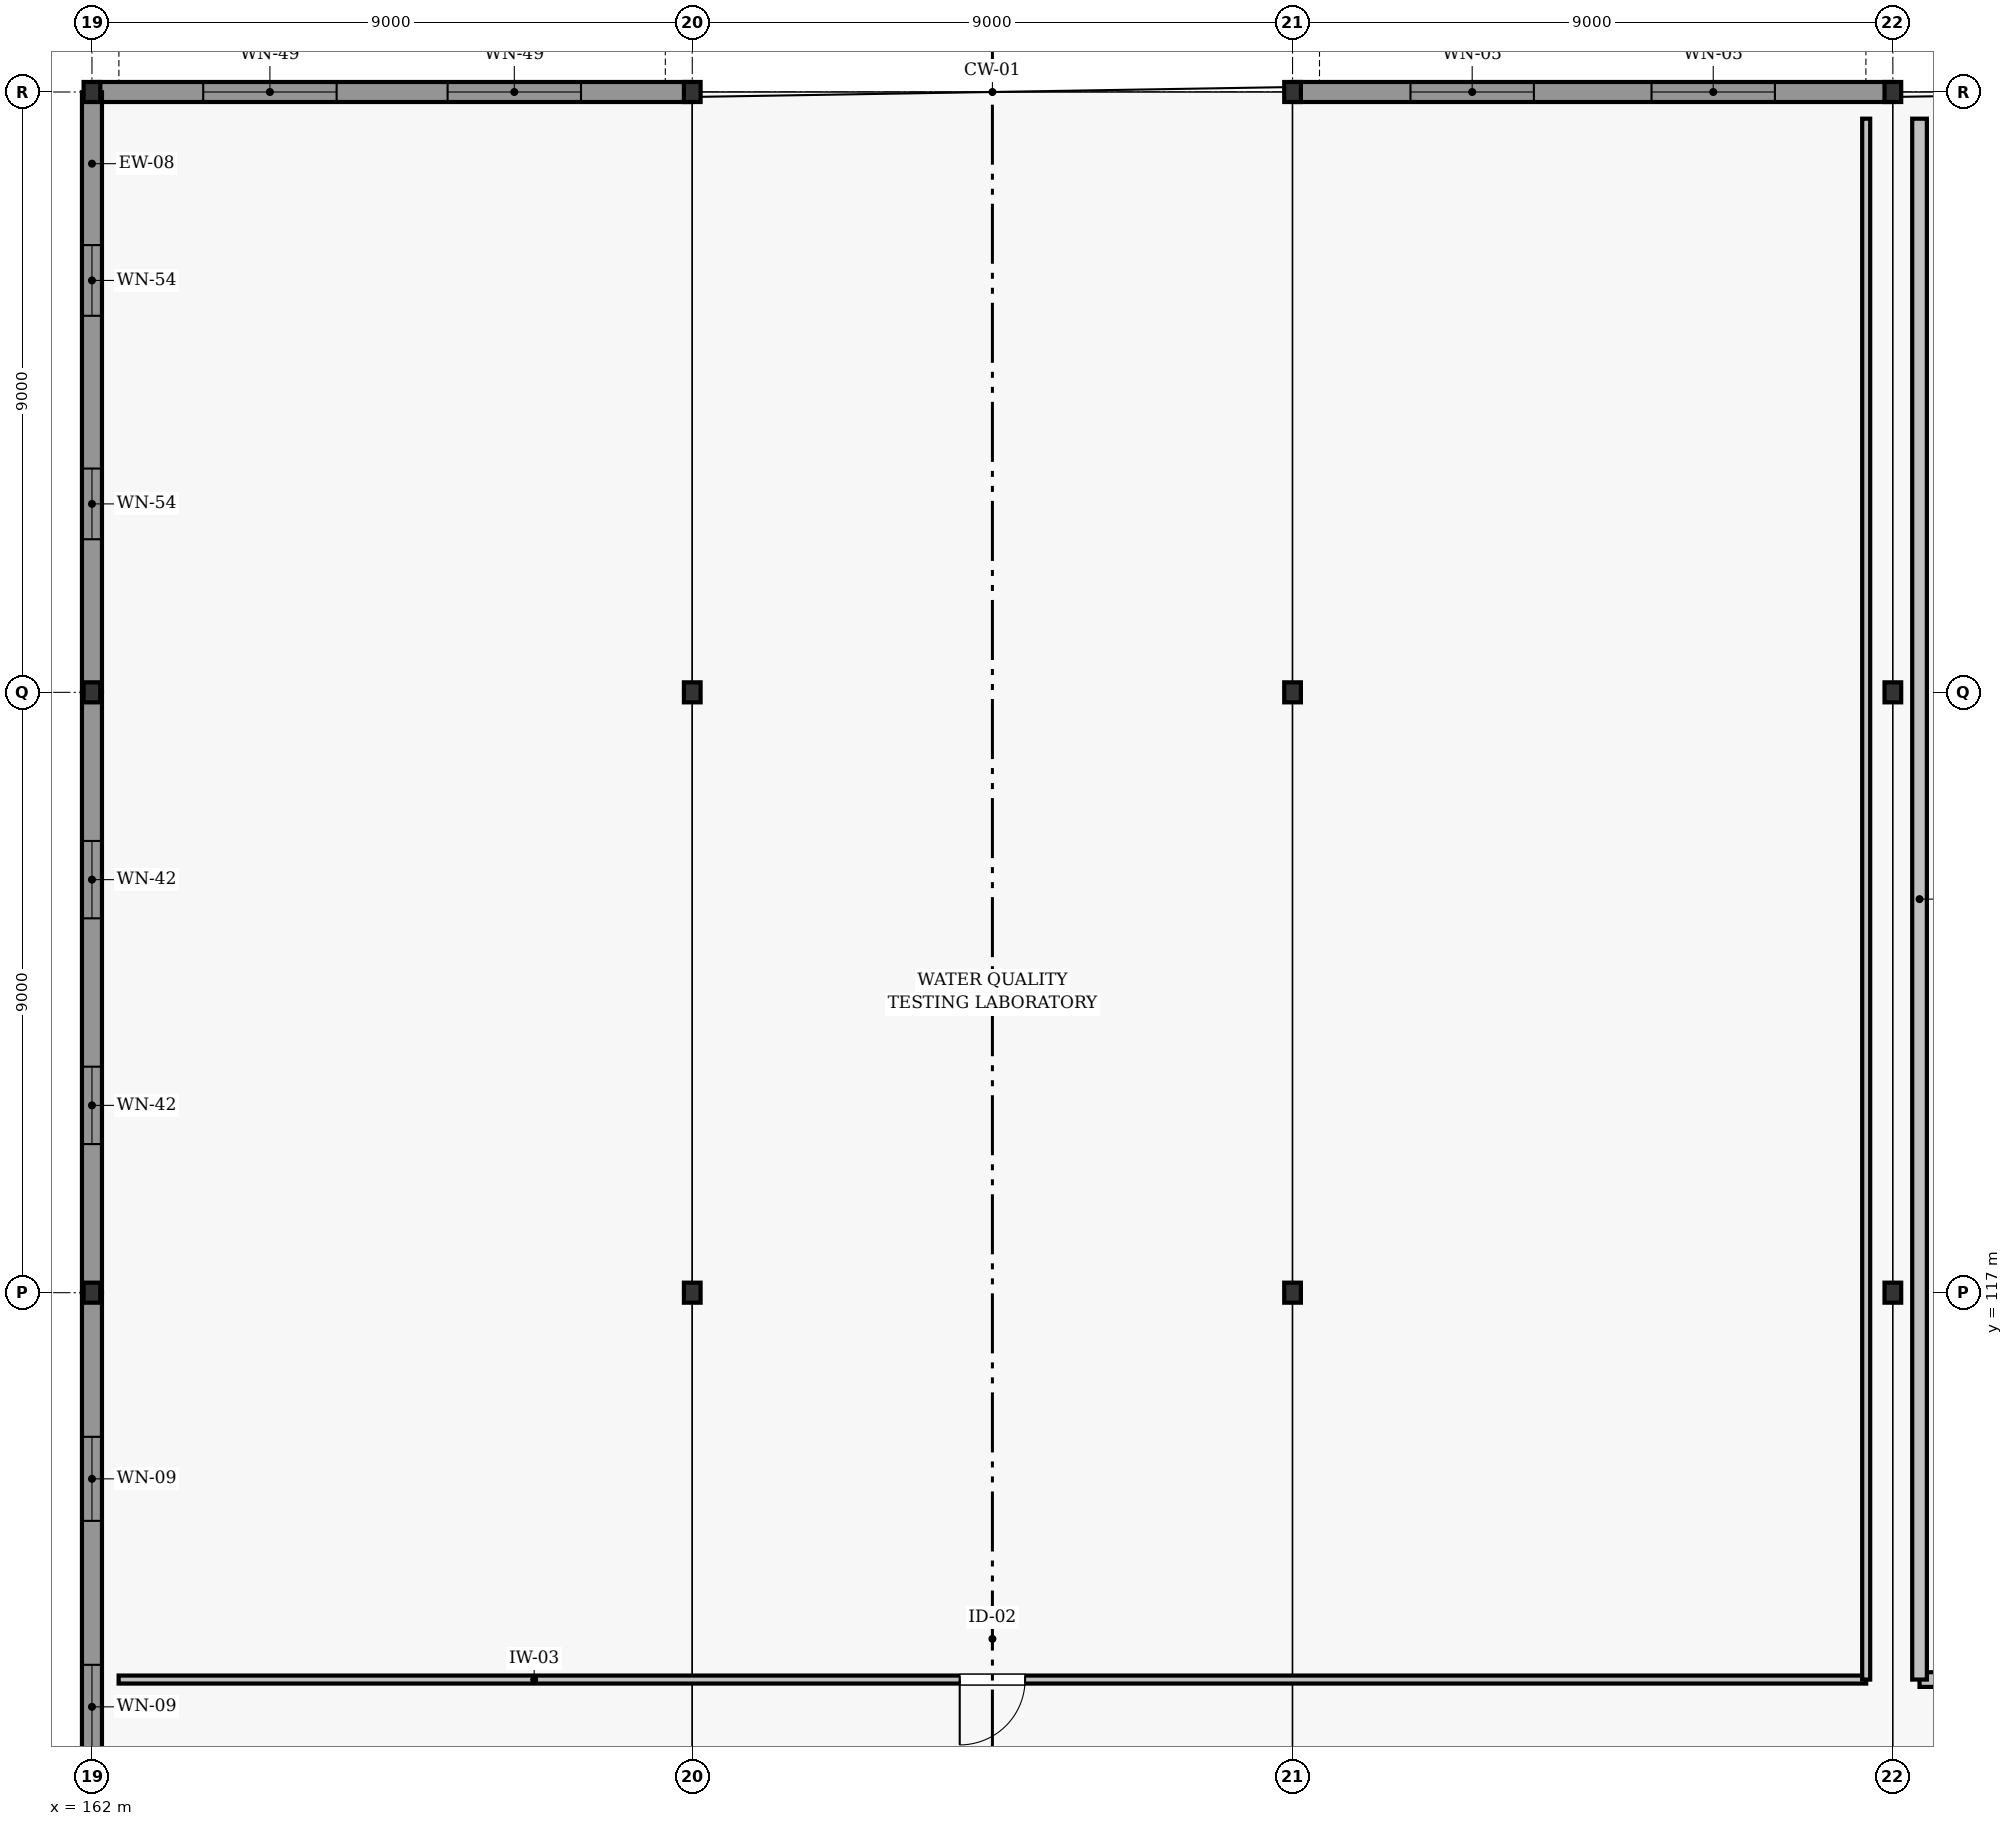
"""IFC4 building model, lengths in metres.
Left out: names, types, materials, properties, quantities, classifications, styles, units other than length and angle.
Written with IfcOpenShell. Run it as: python <this file> out.ifc"""

import sys

from ifc_helpers import new_model, si_unit, direction, frame, frame_2d, origin, origin_2d, place, context, subcontext, project, spatial, rectangle, i_section, extrude, element, fill, save


model = new_model("IFC4")
c1 = context("Model", 3, precision=1e-05, world=origin(), true_north=direction((0.0, 1.0)))
c2 = subcontext(c1, "Body", "Model", "MODEL_VIEW")
j1 = project(units=[si_unit("LENGTHUNIT", "METRE"), si_unit("PLANEANGLEUNIT", "RADIAN")], contexts=[c1])
p1 = place(None, origin())
s1 = spatial("IfcSite", under=j1, at=p1, CompositionType="ELEMENT")
p2 = place(p1, origin())
s2 = spatial("IfcBuilding", under=s1, at=p2, CompositionType="ELEMENT")
p3 = place(p2, frame((0.0, 0.0, 4.8)))
s3 = spatial("IfcBuildingStorey", under=s2, at=p3, CompositionType="ELEMENT", Elevation=4.8)
for number, where, z_axis, x_axis in (
    (1, (162.0, 117.0, 0.0), (0.0, 0.0, 1.0), (1.0, 0.0, 0.0)),
    (2, (162.0, 126.0, 0.0), (0.0, 0.0, 1.0), (1.0, 0.0, 0.0)),
    (3, (162.0, 135.0, 0.0), (0.0, 0.0, 1.0), (1.0, 0.0, 0.0)),
    (4, (171.0, 117.0, 0.0), (0.0, 0.0, 1.0), (1.0, 0.0, 0.0)),
    (5, (171.0, 126.0, 0.0), (0.0, 0.0, 1.0), (1.0, 0.0, 0.0)),
    (6, (171.0, 135.0, 0.0), (0.0, 0.0, 1.0), (1.0, 0.0, 0.0)),
    (7, (180.0, 117.0, 0.0), (0.0, 0.0, 1.0), (1.0, 0.0, 0.0)),
    (8, (180.0, 126.0, 0.0), (0.0, 0.0, 1.0), (1.0, 0.0, 0.0)),
    (9, (180.0, 135.0, 0.0), (0.0, 0.0, 1.0), (1.0, 0.0, 0.0)),
    (10, (189.0, 117.0, 0.0), (0.0, 0.0, 1.0), (1.0, 0.0, 0.0)),
    (11, (189.0, 126.0, 0.0), (0.0, 0.0, 1.0), (1.0, 0.0, 0.0)),
    (12, (189.0, 135.0, 0.0), (0.0, 0.0, 1.0), (1.0, 0.0, 0.0)),
):
    element("IfcColumn", number, at=place(p3, frame(where, z_axis=z_axis, x_axis=x_axis)), inside=s3, PredefinedType="COLUMN", context=c2, shape_type="SweptSolid", body=[
        extrude(i_section(OverallWidth=0.25, OverallDepth=0.3, WebThickness=0.01, FlangeThickness=0.01, FilletRadius=0.012, at=origin_2d()), origin(), (0.0, 0.0, 1.0), 3.6),
    ])
p4 = place(p3, frame((162.004, 135.0, 0.0), z_axis=(0.0, 0.0, 1.0), x_axis=(1.0, 0.0, 0.0)))
e13 = element("IfcWall", 13, at=p4, inside=s3, PredefinedType="SOLIDWALL", context=c2, shape_type="SweptSolid", body=[
    extrude(rectangle(XDim=8.992, YDim=0.3, at=frame_2d((4.496, 0.0))), origin(), (0.0, 0.0, 1.0), 2.842),
])
p5 = place(p4, frame((1.664, 0.0, 1.5)))
e14 = element("IfcOpeningElement", 14, at=p5, cuts=e13, PredefinedType="OPENING", context=c2, shape_type="SweptSolid", body=[
    extrude(rectangle(XDim=2.0, YDim=1.08, at=frame_2d((1.0, 0.54))), frame((0.0, 0.16, 0.0), z_axis=(0.0, -1.0, 0.0), x_axis=(1.0, 0.0, 0.0)), (0.0, 0.0, 1.0), 0.32),
])
p6 = place(p4, frame((5.328, 0.0, 1.5)))
e15 = element("IfcOpeningElement", 15, at=p6, cuts=e13, PredefinedType="OPENING", context=c2, shape_type="SweptSolid", body=[
    extrude(rectangle(XDim=2.0, YDim=1.08, at=frame_2d((1.0, 0.54))), frame((0.0, 0.16, 0.0), z_axis=(0.0, -1.0, 0.0), x_axis=(1.0, 0.0, 0.0)), (0.0, 0.0, 1.0), 0.32),
])
p7 = place(p3, frame((180.004, 135.0, 0.0), z_axis=(0.0, 0.0, 1.0), x_axis=(1.0, 0.0, 0.0)))
e16 = element("IfcWall", 16, at=p7, inside=s3, PredefinedType="SOLIDWALL", context=c2, shape_type="SweptSolid", body=[
    extrude(rectangle(XDim=8.992, YDim=0.3, at=frame_2d((4.496, 0.0))), origin(), (0.0, 0.0, 1.0), 2.842),
])
p8 = place(p7, frame((1.764, 0.0, 1.55)))
e17 = element("IfcOpeningElement", 17, at=p8, cuts=e16, PredefinedType="OPENING", context=c2, shape_type="SweptSolid", body=[
    extrude(rectangle(XDim=1.85, YDim=1.04, at=frame_2d((0.925, 0.52))), frame((0.0, 0.16, 0.0), z_axis=(0.0, -1.0, 0.0), x_axis=(1.0, 0.0, 0.0)), (0.0, 0.0, 1.0), 0.32),
])
p9 = place(p7, frame((5.378, 0.0, 1.55)))
e18 = element("IfcOpeningElement", 18, at=p9, cuts=e16, PredefinedType="OPENING", context=c2, shape_type="SweptSolid", body=[
    extrude(rectangle(XDim=1.85, YDim=1.04, at=frame_2d((0.925, 0.52))), frame((0.0, 0.16, 0.0), z_axis=(0.0, -1.0, 0.0), x_axis=(1.0, 0.0, 0.0)), (0.0, 0.0, 1.0), 0.32),
])
p10 = place(p3, frame((162.0, 108.004, 0.0), z_axis=(0.0, 0.0, 1.0), x_axis=(0.0, 1.0, 0.0)))
e19 = element("IfcWall", 19, at=p10, inside=s3, PredefinedType="SOLIDWALL", context=c2, shape_type="SweptSolid", body=[
    extrude(rectangle(XDim=8.992, YDim=0.3, at=frame_2d((4.496, 0.0))), origin(), (0.0, 0.0, 1.0), 2.842),
])
p11 = place(p10, frame((2.157, 0.0, 0.85)))
e20 = element("IfcOpeningElement", 20, at=p11, cuts=e19, PredefinedType="OPENING", context=c2, shape_type="SweptSolid", body=[
    extrude(rectangle(XDim=1.26, YDim=1.46, at=frame_2d((0.63, 0.73))), frame((0.0, 0.16, 0.0), z_axis=(0.0, -1.0, 0.0), x_axis=(1.0, 0.0, 0.0)), (0.0, 0.0, 1.0), 0.32),
])
p12 = place(p10, frame((5.575, 0.0, 0.85)))
e21 = element("IfcOpeningElement", 21, at=p12, cuts=e19, PredefinedType="OPENING", context=c2, shape_type="SweptSolid", body=[
    extrude(rectangle(XDim=1.26, YDim=1.46, at=frame_2d((0.63, 0.73))), frame((0.0, 0.16, 0.0), z_axis=(0.0, -1.0, 0.0), x_axis=(1.0, 0.0, 0.0)), (0.0, 0.0, 1.0), 0.32),
])
p13 = place(p3, frame((162.0, 117.004, 0.0), z_axis=(0.0, 0.0, 1.0), x_axis=(0.0, 1.0, 0.0)))
e22 = element("IfcWall", 22, at=p13, inside=s3, PredefinedType="SOLIDWALL", context=c2, shape_type="SweptSolid", body=[
    extrude(rectangle(XDim=8.992, YDim=0.3, at=frame_2d((4.496, 0.0))), origin(), (0.0, 0.0, 1.0), 2.842),
])
p14 = place(p13, frame((2.224, 0.0, 0.85)))
e23 = element("IfcOpeningElement", 23, at=p14, cuts=e22, PredefinedType="OPENING", context=c2, shape_type="SweptSolid", body=[
    extrude(rectangle(XDim=1.16, YDim=1.4, at=frame_2d((0.58, 0.7))), frame((0.0, 0.16, 0.0), z_axis=(0.0, -1.0, 0.0), x_axis=(1.0, 0.0, 0.0)), (0.0, 0.0, 1.0), 0.32),
])
p15 = place(p13, frame((5.608, 0.0, 0.85)))
e24 = element("IfcOpeningElement", 24, at=p15, cuts=e22, PredefinedType="OPENING", context=c2, shape_type="SweptSolid", body=[
    extrude(rectangle(XDim=1.16, YDim=1.4, at=frame_2d((0.58, 0.7))), frame((0.0, 0.16, 0.0), z_axis=(0.0, -1.0, 0.0), x_axis=(1.0, 0.0, 0.0)), (0.0, 0.0, 1.0), 0.32),
])
p16 = place(p3, frame((162.0, 126.004, 0.0), z_axis=(0.0, 0.0, 1.0), x_axis=(0.0, 1.0, 0.0)))
e25 = element("IfcWall", 25, at=p16, inside=s3, PredefinedType="SOLIDWALL", context=c2, shape_type="SweptSolid", body=[
    extrude(rectangle(XDim=8.992, YDim=0.3, at=frame_2d((4.496, 0.0))), origin(), (0.0, 0.0, 1.0), 2.842),
])
p17 = place(p16, frame((2.291, 0.0, 0.85)))
e26 = element("IfcOpeningElement", 26, at=p17, cuts=e25, PredefinedType="OPENING", context=c2, shape_type="SweptSolid", body=[
    extrude(rectangle(XDim=1.06, YDim=1.35, at=frame_2d((0.53, 0.675))), frame((0.0, 0.16, 0.0), z_axis=(0.0, -1.0, 0.0), x_axis=(1.0, 0.0, 0.0)), (0.0, 0.0, 1.0), 0.32),
])
p18 = place(p16, frame((5.641, 0.0, 0.85)))
e27 = element("IfcOpeningElement", 27, at=p18, cuts=e25, PredefinedType="OPENING", context=c2, shape_type="SweptSolid", body=[
    extrude(rectangle(XDim=1.06, YDim=1.35, at=frame_2d((0.53, 0.675))), frame((0.0, 0.16, 0.0), z_axis=(0.0, -1.0, 0.0), x_axis=(1.0, 0.0, 0.0)), (0.0, 0.0, 1.0), 0.32),
])
p19 = place(p3, frame((162.4, 111.2, 0.0), z_axis=(0.0, 0.0, 1.0), x_axis=(1.0, 0.0, 0.0)))
e28 = element("IfcWall", 28, at=p19, inside=s3, PredefinedType="PARTITIONING", context=c2, shape_type="SweptSolid", body=[
    extrude(rectangle(XDim=26.2, YDim=0.12, at=frame_2d((13.1, 0.0))), origin(), (0.0, 0.0, 1.0), 2.845),
])
p20 = place(p19, frame((12.61, 0.0, 0.0)))
e29 = element("IfcOpeningElement", 29, at=p20, cuts=e28, PredefinedType="OPENING", context=c2, shape_type="SweptSolid", body=[
    extrude(rectangle(XDim=0.98, YDim=2.08, at=frame_2d((0.49, 1.04))), frame((0.0, 0.07, 0.0), z_axis=(0.0, -1.0, 0.0), x_axis=(1.0, 0.0, 0.0)), (0.0, 0.0, 1.0), 0.14),
])
p21 = place(p3, frame((188.6, 111.2, 0.0), z_axis=(0.0, 0.0, 1.0), x_axis=(0.0, 1.0, 0.0)))
e30 = element("IfcWall", 30, at=p21, inside=s3, PredefinedType="PARTITIONING", context=c2, shape_type="SweptSolid", body=[
    extrude(rectangle(XDim=23.4, YDim=0.12, at=frame_2d((11.7, 0.0))), origin(), (0.0, 0.0, 1.0), 2.845),
])
p22 = place(p3, frame((189.4, 111.2, 0.0), z_axis=(0.0, 0.0, 1.0), x_axis=(1.0, 0.0, 0.0)))
e31 = element("IfcWall", 31, at=p22, inside=s3, PredefinedType="SOLIDWALL", context=c2, shape_type="SweptSolid", body=[
    extrude(rectangle(XDim=17.4, YDim=0.22, at=frame_2d((8.7, 0.0))), origin(), (0.0, 0.0, 1.0), 2.845),
])
p23 = place(p22, frame((3.39, 0.0, 0.0)))
e32 = element("IfcOpeningElement", 32, at=p23, cuts=e31, PredefinedType="OPENING", context=c2, shape_type="SweptSolid", body=[
    extrude(rectangle(XDim=1.42, YDim=2.12, at=frame_2d((0.71, 1.06))), frame((0.0, 0.12, 0.0), z_axis=(0.0, -1.0, 0.0), x_axis=(1.0, 0.0, 0.0)), (0.0, 0.0, 1.0), 0.24),
])
p24 = place(p3, frame((189.4, 111.2, 0.0), z_axis=(0.0, 0.0, 1.0), x_axis=(0.0, 1.0, 0.0)))
e33 = element("IfcWall", 33, at=p24, inside=s3, PredefinedType="SOLIDWALL", context=c2, shape_type="SweptSolid", body=[
    extrude(rectangle(XDim=23.4, YDim=0.22, at=frame_2d((11.7, 0.0))), origin(), (0.0, 0.0, 1.0), 2.845),
])
p25 = place(p5, origin())
e34 = element("IfcWindow", 34, at=p25, inside=s3, PartitioningType="SINGLE_PANEL", PredefinedType="WINDOW", context=c2, shape_type="SweptSolid", body=[
    extrude(rectangle(XDim=2.0, YDim=1.08, at=frame_2d((1.0, 0.54))), frame((0.0, 0.03, 0.0), z_axis=(0.0, -1.0, 0.0), x_axis=(1.0, 0.0, 0.0)), (0.0, 0.0, 1.0), 0.06),
])
fill(e14, e34)
p26 = place(p6, origin())
e35 = element("IfcWindow", 35, at=p26, inside=s3, PartitioningType="SINGLE_PANEL", PredefinedType="WINDOW", context=c2, shape_type="SweptSolid", body=[
    extrude(rectangle(XDim=2.0, YDim=1.08, at=frame_2d((1.0, 0.54))), frame((0.0, 0.03, 0.0), z_axis=(0.0, -1.0, 0.0), x_axis=(1.0, 0.0, 0.0)), (0.0, 0.0, 1.0), 0.06),
])
fill(e15, e35)
p27 = place(p8, origin())
e36 = element("IfcWindow", 36, at=p27, inside=s3, PartitioningType="SINGLE_PANEL", PredefinedType="WINDOW", context=c2, shape_type="SweptSolid", body=[
    extrude(rectangle(XDim=1.85, YDim=1.04, at=frame_2d((0.925, 0.52))), frame((0.0, 0.03, 0.0), z_axis=(0.0, -1.0, 0.0), x_axis=(1.0, 0.0, 0.0)), (0.0, 0.0, 1.0), 0.06),
])
fill(e17, e36)
p28 = place(p9, origin())
e37 = element("IfcWindow", 37, at=p28, inside=s3, PartitioningType="SINGLE_PANEL", PredefinedType="WINDOW", context=c2, shape_type="SweptSolid", body=[
    extrude(rectangle(XDim=1.85, YDim=1.04, at=frame_2d((0.925, 0.52))), frame((0.0, 0.03, 0.0), z_axis=(0.0, -1.0, 0.0), x_axis=(1.0, 0.0, 0.0)), (0.0, 0.0, 1.0), 0.06),
])
fill(e18, e37)
p29 = place(p11, origin())
e38 = element("IfcWindow", 38, at=p29, inside=s3, PartitioningType="SINGLE_PANEL", PredefinedType="WINDOW", context=c2, shape_type="SweptSolid", body=[
    extrude(rectangle(XDim=1.26, YDim=1.46, at=frame_2d((0.63, 0.73))), frame((0.0, 0.03, 0.0), z_axis=(0.0, -1.0, 0.0), x_axis=(1.0, 0.0, 0.0)), (0.0, 0.0, 1.0), 0.06),
])
fill(e20, e38)
p30 = place(p12, origin())
e39 = element("IfcWindow", 39, at=p30, inside=s3, PartitioningType="SINGLE_PANEL", PredefinedType="WINDOW", context=c2, shape_type="SweptSolid", body=[
    extrude(rectangle(XDim=1.26, YDim=1.46, at=frame_2d((0.63, 0.73))), frame((0.0, 0.03, 0.0), z_axis=(0.0, -1.0, 0.0), x_axis=(1.0, 0.0, 0.0)), (0.0, 0.0, 1.0), 0.06),
])
fill(e21, e39)
p31 = place(p14, origin())
e40 = element("IfcWindow", 40, at=p31, inside=s3, PartitioningType="SINGLE_PANEL", PredefinedType="WINDOW", context=c2, shape_type="SweptSolid", body=[
    extrude(rectangle(XDim=1.16, YDim=1.4, at=frame_2d((0.58, 0.7))), frame((0.0, 0.03, 0.0), z_axis=(0.0, -1.0, 0.0), x_axis=(1.0, 0.0, 0.0)), (0.0, 0.0, 1.0), 0.06),
])
fill(e23, e40)
p32 = place(p15, origin())
e41 = element("IfcWindow", 41, at=p32, inside=s3, PartitioningType="SINGLE_PANEL", PredefinedType="WINDOW", context=c2, shape_type="SweptSolid", body=[
    extrude(rectangle(XDim=1.16, YDim=1.4, at=frame_2d((0.58, 0.7))), frame((0.0, 0.03, 0.0), z_axis=(0.0, -1.0, 0.0), x_axis=(1.0, 0.0, 0.0)), (0.0, 0.0, 1.0), 0.06),
])
fill(e24, e41)
p33 = place(p17, origin())
e42 = element("IfcWindow", 42, at=p33, inside=s3, PartitioningType="SINGLE_PANEL", PredefinedType="WINDOW", context=c2, shape_type="SweptSolid", body=[
    extrude(rectangle(XDim=1.06, YDim=1.35, at=frame_2d((0.53, 0.675))), frame((0.0, 0.03, 0.0), z_axis=(0.0, -1.0, 0.0), x_axis=(1.0, 0.0, 0.0)), (0.0, 0.0, 1.0), 0.06),
])
fill(e26, e42)
p34 = place(p18, origin())
e43 = element("IfcWindow", 43, at=p34, inside=s3, PartitioningType="SINGLE_PANEL", PredefinedType="WINDOW", context=c2, shape_type="SweptSolid", body=[
    extrude(rectangle(XDim=1.06, YDim=1.35, at=frame_2d((0.53, 0.675))), frame((0.0, 0.03, 0.0), z_axis=(0.0, -1.0, 0.0), x_axis=(1.0, 0.0, 0.0)), (0.0, 0.0, 1.0), 0.06),
])
fill(e27, e43)
p35 = place(p20, frame((0.98, 0.0, 0.0), z_axis=(0.0, 0.0, 1.0), x_axis=(-1.0, 0.0, 0.0)))
e44 = element("IfcDoor", 44, at=p35, inside=s3, OperationType="SINGLE_SWING_LEFT", PredefinedType="DOOR", context=c2, shape_type="SweptSolid", body=[
    extrude(rectangle(XDim=0.98, YDim=2.08, at=frame_2d((0.49, 1.04))), frame((0.0, 0.025, 0.0), z_axis=(0.0, -1.0, 0.0), x_axis=(1.0, 0.0, 0.0)), (0.0, 0.0, 1.0), 0.05),
])
fill(e29, e44)
save(model, sys.argv[1])
